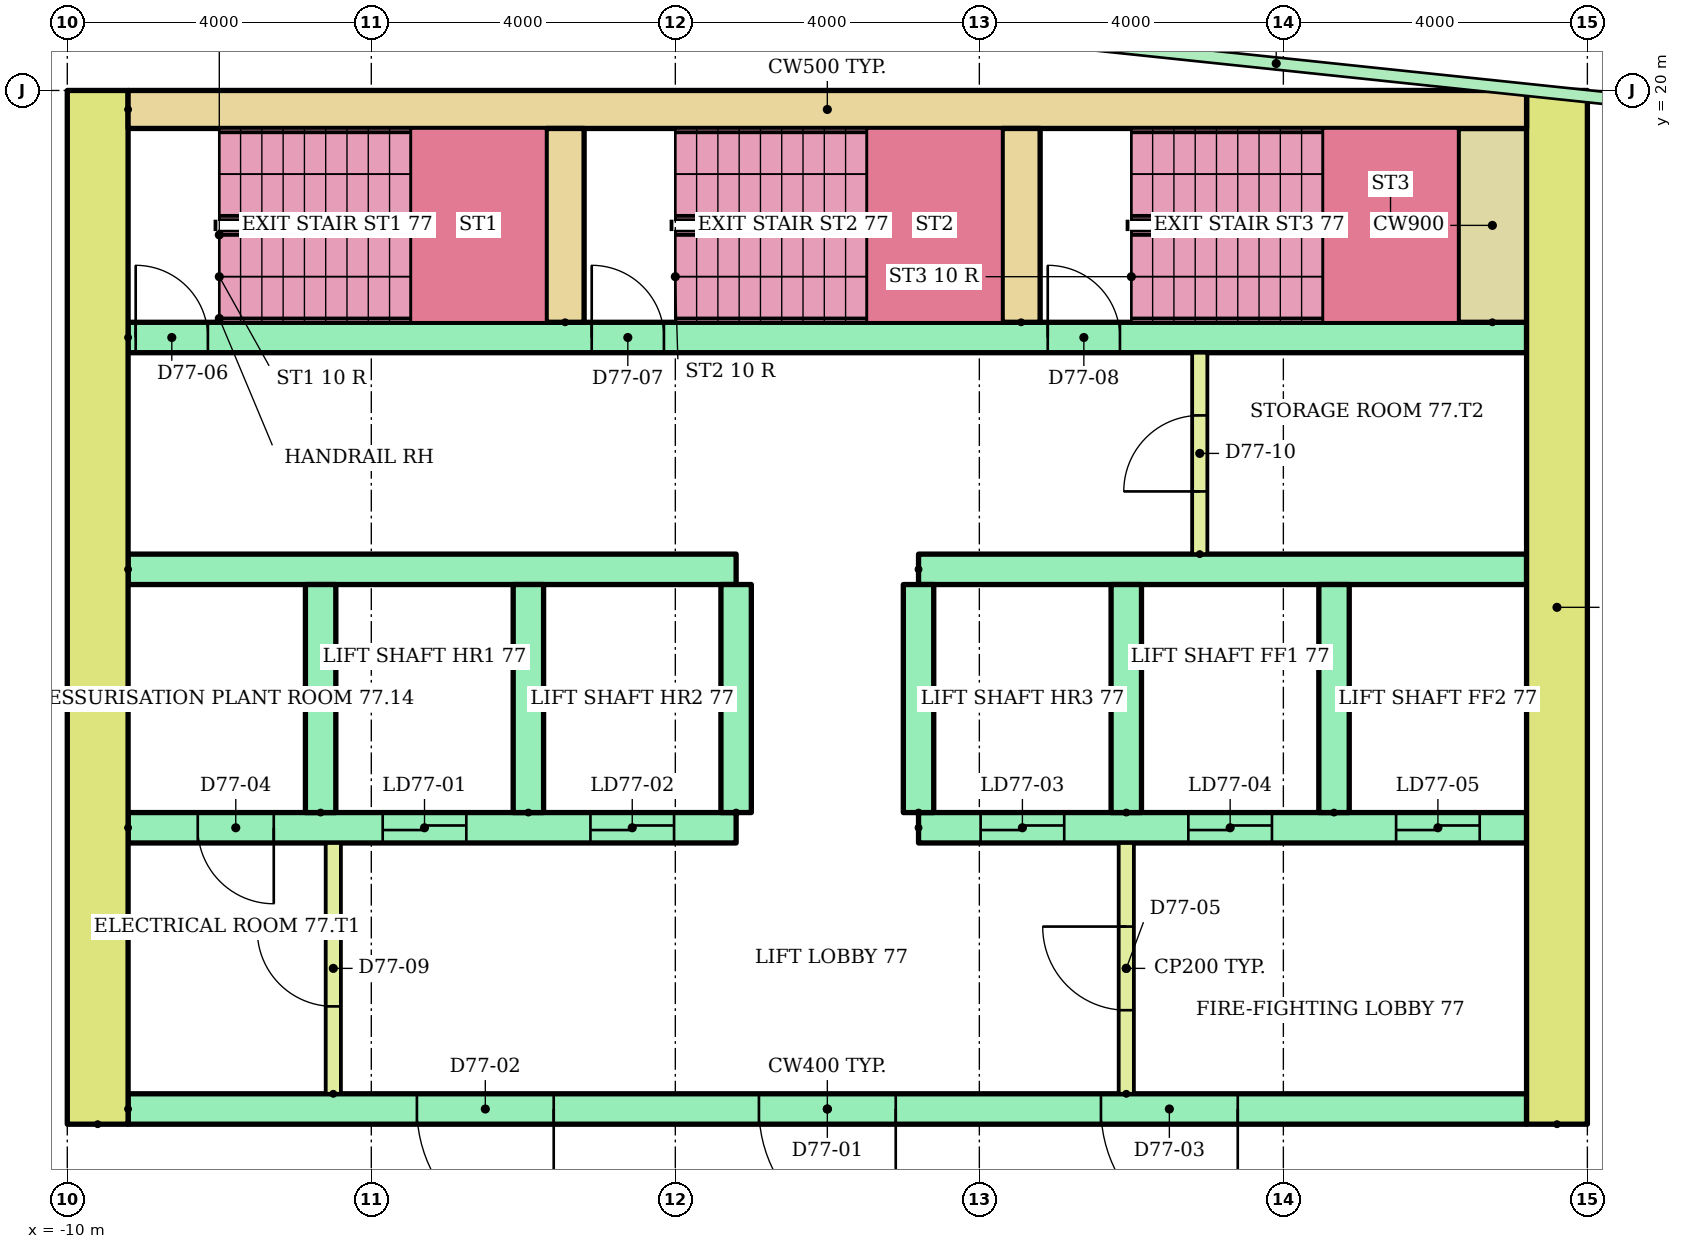
"""IFC4 building model, lengths in metres.
Left out: names, types, materials, properties, quantities, classifications, styles, units other than length and angle.
Written with IfcOpenShell. Run it as: python <this file> out.ifc"""

import sys

from ifc_helpers import new_model, si_unit, direction, frame, frame_2d, origin, place, context, subcontext, project, spatial, rectangle, extrude, element, fill, save


model = new_model("IFC4")
c1 = context("Model", 3, precision=1e-05, world=origin(), true_north=direction((0.0, 1.0)))
c2 = subcontext(c1, "Body", "Model", "MODEL_VIEW")
j1 = project(units=[si_unit("LENGTHUNIT", "METRE"), si_unit("PLANEANGLEUNIT", "RADIAN")], contexts=[c1])
p1 = place(None, origin())
s1 = spatial("IfcSite", under=j1, at=p1, CompositionType="ELEMENT")
p2 = place(p1, origin())
s2 = spatial("IfcBuilding", under=s1, at=p2, CompositionType="ELEMENT")
p3 = place(p2, frame((0.0, 0.0, 298.3)))
s3 = spatial("IfcBuildingStorey", under=s2, at=p3, CompositionType="ELEMENT", Elevation=298.3)
for number, where, z_axis, x_axis in (
    (1, (-9.6, 6.4, 0.0), (0.0, 0.0, 1.0), (0.0, 1.0, 0.0)),
    (2, (9.6, 6.4, 0.0), (0.0, 0.0, 1.0), (0.0, 1.0, 0.0)),
):
    element("IfcWall", number, at=place(p3, frame(where, z_axis=z_axis, x_axis=x_axis)), inside=s3, PredefinedType="SHEAR", context=c2, shape_type="SweptSolid", body=[
        extrude(rectangle(XDim=13.6, YDim=0.8, at=frame_2d((6.8, 0.0))), origin(), (0.0, 0.0, 1.0), 2.9),
    ])
p4 = place(p3, frame((-9.2, 19.75, 0.0)))
e3 = element("IfcWall", 3, at=p4, inside=s3, PredefinedType="SHEAR", context=c2, shape_type="SweptSolid", body=[
    extrude(rectangle(XDim=18.4, YDim=0.5, at=frame_2d((9.2, 0.0))), origin(), (0.0, 0.0, 1.0), 2.9),
])
p5 = place(p3, frame((-9.2, 6.6, 0.0)))
e4 = element("IfcWall", 4, at=p5, inside=s3, PredefinedType="SHEAR", context=c2, shape_type="SweptSolid", body=[
    extrude(rectangle(XDim=18.4, YDim=0.4, at=frame_2d((9.2, 0.0))), origin(), (0.0, 0.0, 1.0), 2.9),
])
p6 = place(p5, frame((8.3, 0.0, 0.0)))
e5 = element("IfcOpeningElement", 5, at=p6, cuts=e4, PredefinedType="OPENING", context=c2, shape_type="SweptSolid", body=[
    extrude(rectangle(XDim=1.8, YDim=2.1, at=frame_2d((0.9, 1.05))), frame((0.0, 0.21, 0.0), z_axis=(0.0, -1.0, 0.0), x_axis=(1.0, 0.0, 0.0)), (0.0, 0.0, 1.0), 0.42),
])
p7 = place(p5, frame((3.8, 0.0, 0.0)))
e6 = element("IfcOpeningElement", 6, at=p7, cuts=e4, PredefinedType="OPENING", context=c2, shape_type="SweptSolid", body=[
    extrude(rectangle(XDim=1.8, YDim=2.1, at=frame_2d((0.9, 1.05))), frame((0.0, 0.21, 0.0), z_axis=(0.0, -1.0, 0.0), x_axis=(1.0, 0.0, 0.0)), (0.0, 0.0, 1.0), 0.42),
])
p8 = place(p5, frame((12.8, 0.0, 0.0)))
e7 = element("IfcOpeningElement", 7, at=p8, cuts=e4, PredefinedType="OPENING", context=c2, shape_type="SweptSolid", body=[
    extrude(rectangle(XDim=1.8, YDim=2.1, at=frame_2d((0.9, 1.05))), frame((0.0, 0.21, 0.0), z_axis=(0.0, -1.0, 0.0), x_axis=(1.0, 0.0, 0.0)), (0.0, 0.0, 1.0), 0.42),
])
p9 = place(p3, frame((-9.2, 10.3, 0.0)))
e8 = element("IfcWall", 8, at=p9, inside=s3, PredefinedType="SHEAR", context=c2, shape_type="SweptSolid", body=[
    extrude(rectangle(XDim=8.0, YDim=0.4, at=frame_2d((4.0, 0.0))), origin(), (0.0, 0.0, 1.0), 2.9),
])
p10 = place(p9, frame((3.35, 0.0, 0.0)))
e9 = element("IfcOpeningElement", 9, at=p10, cuts=e8, PredefinedType="OPENING", context=c2, shape_type="SweptSolid", body=[
    extrude(rectangle(XDim=1.1, YDim=2.1, at=frame_2d((0.55, 1.05))), frame((0.0, 0.21, 0.0), z_axis=(0.0, -1.0, 0.0), x_axis=(1.0, 0.0, 0.0)), (0.0, 0.0, 1.0), 0.42),
])
p11 = place(p9, frame((6.083, 0.0, 0.0)))
e10 = element("IfcOpeningElement", 10, at=p11, cuts=e8, PredefinedType="OPENING", context=c2, shape_type="SweptSolid", body=[
    extrude(rectangle(XDim=1.1, YDim=2.1, at=frame_2d((0.55, 1.05))), frame((0.0, 0.21, 0.0), z_axis=(0.0, -1.0, 0.0), x_axis=(1.0, 0.0, 0.0)), (0.0, 0.0, 1.0), 0.42),
])
p12 = place(p9, frame((0.917, 0.0, 0.0)))
e11 = element("IfcOpeningElement", 11, at=p12, cuts=e8, PredefinedType="OPENING", context=c2, shape_type="SweptSolid", body=[
    extrude(rectangle(XDim=1.0, YDim=2.1, at=frame_2d((0.5, 1.05))), frame((0.0, 0.21, 0.0), z_axis=(0.0, -1.0, 0.0), x_axis=(1.0, 0.0, 0.0)), (0.0, 0.0, 1.0), 0.42),
])
p13 = place(p3, frame((-9.2, 13.7, 0.0)))
e12 = element("IfcWall", 12, at=p13, inside=s3, PredefinedType="SHEAR", context=c2, shape_type="SweptSolid", body=[
    extrude(rectangle(XDim=8.0, YDim=0.4, at=frame_2d((4.0, 0.0))), origin(), (0.0, 0.0, 1.0), 2.9),
])
p14 = place(p3, frame((1.2, 10.3, 0.0)))
e13 = element("IfcWall", 13, at=p14, inside=s3, PredefinedType="SHEAR", context=c2, shape_type="SweptSolid", body=[
    extrude(rectangle(XDim=8.0, YDim=0.4, at=frame_2d((4.0, 0.0))), origin(), (0.0, 0.0, 1.0), 2.9),
])
p15 = place(p14, frame((0.817, 0.0, 0.0)))
e14 = element("IfcOpeningElement", 14, at=p15, cuts=e13, PredefinedType="OPENING", context=c2, shape_type="SweptSolid", body=[
    extrude(rectangle(XDim=1.1, YDim=2.1, at=frame_2d((0.55, 1.05))), frame((0.0, 0.21, 0.0), z_axis=(0.0, -1.0, 0.0), x_axis=(1.0, 0.0, 0.0)), (0.0, 0.0, 1.0), 0.42),
])
p16 = place(p14, frame((3.55, 0.0, 0.0)))
e15 = element("IfcOpeningElement", 15, at=p16, cuts=e13, PredefinedType="OPENING", context=c2, shape_type="SweptSolid", body=[
    extrude(rectangle(XDim=1.1, YDim=2.1, at=frame_2d((0.55, 1.05))), frame((0.0, 0.21, 0.0), z_axis=(0.0, -1.0, 0.0), x_axis=(1.0, 0.0, 0.0)), (0.0, 0.0, 1.0), 0.42),
])
p17 = place(p14, frame((6.283, 0.0, 0.0)))
e16 = element("IfcOpeningElement", 16, at=p17, cuts=e13, PredefinedType="OPENING", context=c2, shape_type="SweptSolid", body=[
    extrude(rectangle(XDim=1.1, YDim=2.1, at=frame_2d((0.55, 1.05))), frame((0.0, 0.21, 0.0), z_axis=(0.0, -1.0, 0.0), x_axis=(1.0, 0.0, 0.0)), (0.0, 0.0, 1.0), 0.42),
])
p18 = place(p3, frame((1.2, 13.7, 0.0)))
e17 = element("IfcWall", 17, at=p18, inside=s3, PredefinedType="SHEAR", context=c2, shape_type="SweptSolid", body=[
    extrude(rectangle(XDim=8.0, YDim=0.4, at=frame_2d((4.0, 0.0))), origin(), (0.0, 0.0, 1.0), 2.9),
])
for number, where, z_axis, x_axis in (
    (18, (-6.667, 10.5, 0.0), (0.0, 0.0, 1.0), (0.0, 1.0, 0.0)),
    (19, (-3.933, 10.5, 0.0), (0.0, 0.0, 1.0), (0.0, 1.0, 0.0)),
    (20, (-1.2, 10.5, 0.0), (0.0, 0.0, 1.0), (0.0, 1.0, 0.0)),
    (21, (1.2, 10.5, 0.0), (0.0, 0.0, 1.0), (0.0, 1.0, 0.0)),
    (22, (3.933, 10.5, 0.0), (0.0, 0.0, 1.0), (0.0, 1.0, 0.0)),
    (23, (6.667, 10.5, 0.0), (0.0, 0.0, 1.0), (0.0, 1.0, 0.0)),
):
    element("IfcWall", number, at=place(p3, frame(where, z_axis=z_axis, x_axis=x_axis)), inside=s3, PredefinedType="SHEAR", context=c2, shape_type="SweptSolid", body=[
        extrude(rectangle(XDim=3.0, YDim=0.4, at=frame_2d((1.5, 0.0))), origin(), (0.0, 0.0, 1.0), 2.9),
    ])
p19 = place(p3, frame((3.933, 6.8, 0.0), z_axis=(0.0, 0.0, 1.0), x_axis=(0.0, 1.0, 0.0)))
e24 = element("IfcWall", 24, at=p19, inside=s3, PredefinedType="PARTITIONING", context=c2, shape_type="SweptSolid", body=[
    extrude(rectangle(XDim=3.3, YDim=0.2, at=frame_2d((1.65, 0.0))), origin(), (0.0, 0.0, 1.0), 2.9),
])
p20 = place(p19, frame((1.1, 0.0, 0.0)))
e25 = element("IfcOpeningElement", 25, at=p20, cuts=e24, PredefinedType="OPENING", context=c2, shape_type="SweptSolid", body=[
    extrude(rectangle(XDim=1.1, YDim=2.1, at=frame_2d((0.55, 1.05))), frame((0.0, 0.11, 0.0), z_axis=(0.0, -1.0, 0.0), x_axis=(1.0, 0.0, 0.0)), (0.0, 0.0, 1.0), 0.22),
])
p21 = place(p3, frame((-9.2, 16.75, 0.0)))
e26 = element("IfcWall", 26, at=p21, inside=s3, PredefinedType="SHEAR", context=c2, shape_type="SweptSolid", body=[
    extrude(rectangle(XDim=18.4, YDim=0.4, at=frame_2d((9.2, 0.0))), origin(), (0.0, 0.0, 1.0), 2.9),
])
p22 = place(p21, frame((0.1, 0.0, 0.0)))
e27 = element("IfcOpeningElement", 27, at=p22, cuts=e26, PredefinedType="OPENING", context=c2, shape_type="SweptSolid", body=[
    extrude(rectangle(XDim=0.95, YDim=2.1, at=frame_2d((0.475, 1.05))), frame((0.0, 0.21, 0.0), z_axis=(0.0, -1.0, 0.0), x_axis=(1.0, 0.0, 0.0)), (0.0, 0.0, 1.0), 0.42),
])
p23 = place(p21, frame((6.1, 0.0, 0.0)))
e28 = element("IfcOpeningElement", 28, at=p23, cuts=e26, PredefinedType="OPENING", context=c2, shape_type="SweptSolid", body=[
    extrude(rectangle(XDim=0.95, YDim=2.1, at=frame_2d((0.475, 1.05))), frame((0.0, 0.21, 0.0), z_axis=(0.0, -1.0, 0.0), x_axis=(1.0, 0.0, 0.0)), (0.0, 0.0, 1.0), 0.42),
])
p24 = place(p21, frame((12.1, 0.0, 0.0)))
e29 = element("IfcOpeningElement", 29, at=p24, cuts=e26, PredefinedType="OPENING", context=c2, shape_type="SweptSolid", body=[
    extrude(rectangle(XDim=0.95, YDim=2.1, at=frame_2d((0.475, 1.05))), frame((0.0, 0.21, 0.0), z_axis=(0.0, -1.0, 0.0), x_axis=(1.0, 0.0, 0.0)), (0.0, 0.0, 1.0), 0.42),
])
for number, where, z_axis, x_axis in (
    (30, (-3.45, 16.95, 0.0), (0.0, 0.0, 1.0), (0.0, 1.0, 0.0)),
    (31, (2.55, 16.95, 0.0), (0.0, 0.0, 1.0), (0.0, 1.0, 0.0)),
):
    element("IfcWall", number, at=place(p3, frame(where, z_axis=z_axis, x_axis=x_axis)), inside=s3, PredefinedType="SHEAR", context=c2, shape_type="SweptSolid", body=[
        extrude(rectangle(XDim=2.55, YDim=0.5, at=frame_2d((1.275, 0.0))), origin(), (0.0, 0.0, 1.0), 2.9),
    ])
p25 = place(p3, frame((8.75, 16.95, 0.0), z_axis=(0.0, 0.0, 1.0), x_axis=(0.0, 1.0, 0.0)))
e32 = element("IfcWall", 32, at=p25, inside=s3, PredefinedType="SHEAR", context=c2, shape_type="SweptSolid", body=[
    extrude(rectangle(XDim=2.55, YDim=0.9, at=frame_2d((1.275, 0.0))), origin(), (0.0, 0.0, 1.0), 2.9),
])
p26 = place(p3, frame((-6.5, 6.8, 0.0), z_axis=(0.0, 0.0, 1.0), x_axis=(0.0, 1.0, 0.0)))
e33 = element("IfcWall", 33, at=p26, inside=s3, PredefinedType="PARTITIONING", context=c2, shape_type="SweptSolid", body=[
    extrude(rectangle(XDim=3.3, YDim=0.2, at=frame_2d((1.65, 0.0))), origin(), (0.0, 0.0, 1.0), 2.9),
])
p27 = place(p26, frame((1.15, 0.0, 0.0)))
e34 = element("IfcOpeningElement", 34, at=p27, cuts=e33, PredefinedType="OPENING", context=c2, shape_type="SweptSolid", body=[
    extrude(rectangle(XDim=1.0, YDim=2.1, at=frame_2d((0.5, 1.05))), frame((0.0, 0.11, 0.0), z_axis=(0.0, -1.0, 0.0), x_axis=(1.0, 0.0, 0.0)), (0.0, 0.0, 1.0), 0.22),
])
p28 = place(p3, frame((4.9, 13.9, 0.0), z_axis=(0.0, 0.0, 1.0), x_axis=(0.0, 1.0, 0.0)))
e35 = element("IfcWall", 35, at=p28, inside=s3, PredefinedType="PARTITIONING", context=c2, shape_type="SweptSolid", body=[
    extrude(rectangle(XDim=2.65, YDim=0.2, at=frame_2d((1.325, 0.0))), origin(), (0.0, 0.0, 1.0), 2.9),
])
p29 = place(p28, frame((0.825, 0.0, 0.0)))
e36 = element("IfcOpeningElement", 36, at=p29, cuts=e35, PredefinedType="OPENING", context=c2, shape_type="SweptSolid", body=[
    extrude(rectangle(XDim=1.0, YDim=2.1, at=frame_2d((0.5, 1.05))), frame((0.0, 0.11, 0.0), z_axis=(0.0, -1.0, 0.0), x_axis=(1.0, 0.0, 0.0)), (0.0, 0.0, 1.0), 0.22),
])
p30 = place(p6, frame((1.8, 0.0, 0.0), z_axis=(0.0, 0.0, 1.0), x_axis=(-1.0, 0.0, 0.0)))
e37 = element("IfcDoor", 37, at=p30, inside=s3, OperationType="DOUBLE_DOOR_SINGLE_SWING", PredefinedType="DOOR", context=c2, shape_type="SweptSolid", body=[
    extrude(rectangle(XDim=1.8, YDim=2.1, at=frame_2d((0.9, 1.05))), frame((0.0, 0.025, 0.0), z_axis=(0.0, -1.0, 0.0), x_axis=(1.0, 0.0, 0.0)), (0.0, 0.0, 1.0), 0.05),
])
fill(e5, e37)
p31 = place(p7, frame((1.8, 0.0, 0.0), z_axis=(0.0, 0.0, 1.0), x_axis=(-1.0, 0.0, 0.0)))
e38 = element("IfcDoor", 38, at=p31, inside=s3, OperationType="DOUBLE_DOOR_SINGLE_SWING", PredefinedType="DOOR", context=c2, shape_type="SweptSolid", body=[
    extrude(rectangle(XDim=1.8, YDim=2.1, at=frame_2d((0.9, 1.05))), frame((0.0, 0.025, 0.0), z_axis=(0.0, -1.0, 0.0), x_axis=(1.0, 0.0, 0.0)), (0.0, 0.0, 1.0), 0.05),
])
fill(e6, e38)
p32 = place(p8, frame((1.8, 0.0, 0.0), z_axis=(0.0, 0.0, 1.0), x_axis=(-1.0, 0.0, 0.0)))
e39 = element("IfcDoor", 39, at=p32, inside=s3, OperationType="DOUBLE_DOOR_SINGLE_SWING", PredefinedType="DOOR", context=c2, shape_type="SweptSolid", body=[
    extrude(rectangle(XDim=1.8, YDim=2.1, at=frame_2d((0.9, 1.05))), frame((0.0, 0.025, 0.0), z_axis=(0.0, -1.0, 0.0), x_axis=(1.0, 0.0, 0.0)), (0.0, 0.0, 1.0), 0.05),
])
fill(e7, e39)
p33 = place(p10, origin())
e40 = element("IfcDoor", 40, at=p33, inside=s3, OperationType="SLIDING_TO_LEFT", PredefinedType="DOOR", context=c2, shape_type="SweptSolid", body=[
    extrude(rectangle(XDim=1.1, YDim=2.1, at=frame_2d((0.55, 1.05))), frame((0.0, 0.025, 0.0), z_axis=(0.0, -1.0, 0.0), x_axis=(1.0, 0.0, 0.0)), (0.0, 0.0, 1.0), 0.05),
])
fill(e9, e40)
p34 = place(p11, origin())
e41 = element("IfcDoor", 41, at=p34, inside=s3, OperationType="SLIDING_TO_LEFT", PredefinedType="DOOR", context=c2, shape_type="SweptSolid", body=[
    extrude(rectangle(XDim=1.1, YDim=2.1, at=frame_2d((0.55, 1.05))), frame((0.0, 0.025, 0.0), z_axis=(0.0, -1.0, 0.0), x_axis=(1.0, 0.0, 0.0)), (0.0, 0.0, 1.0), 0.05),
])
fill(e10, e41)
p35 = place(p15, origin())
e42 = element("IfcDoor", 42, at=p35, inside=s3, OperationType="SLIDING_TO_LEFT", PredefinedType="DOOR", context=c2, shape_type="SweptSolid", body=[
    extrude(rectangle(XDim=1.1, YDim=2.1, at=frame_2d((0.55, 1.05))), frame((0.0, 0.025, 0.0), z_axis=(0.0, -1.0, 0.0), x_axis=(1.0, 0.0, 0.0)), (0.0, 0.0, 1.0), 0.05),
])
fill(e14, e42)
p36 = place(p16, origin())
e43 = element("IfcDoor", 43, at=p36, inside=s3, OperationType="SLIDING_TO_LEFT", PredefinedType="DOOR", context=c2, shape_type="SweptSolid", body=[
    extrude(rectangle(XDim=1.1, YDim=2.1, at=frame_2d((0.55, 1.05))), frame((0.0, 0.025, 0.0), z_axis=(0.0, -1.0, 0.0), x_axis=(1.0, 0.0, 0.0)), (0.0, 0.0, 1.0), 0.05),
])
fill(e15, e43)
p37 = place(p17, origin())
e44 = element("IfcDoor", 44, at=p37, inside=s3, OperationType="SLIDING_TO_LEFT", PredefinedType="DOOR", context=c2, shape_type="SweptSolid", body=[
    extrude(rectangle(XDim=1.1, YDim=2.1, at=frame_2d((0.55, 1.05))), frame((0.0, 0.025, 0.0), z_axis=(0.0, -1.0, 0.0), x_axis=(1.0, 0.0, 0.0)), (0.0, 0.0, 1.0), 0.05),
])
fill(e16, e44)
p38 = place(p12, frame((1.0, 0.0, 0.0), z_axis=(0.0, 0.0, 1.0), x_axis=(-1.0, 0.0, 0.0)))
e45 = element("IfcDoor", 45, at=p38, inside=s3, OperationType="SINGLE_SWING_RIGHT", PredefinedType="DOOR", context=c2, shape_type="SweptSolid", body=[
    extrude(rectangle(XDim=1.0, YDim=2.1, at=frame_2d((0.5, 1.05))), frame((0.0, 0.025, 0.0), z_axis=(0.0, -1.0, 0.0), x_axis=(1.0, 0.0, 0.0)), (0.0, 0.0, 1.0), 0.05),
])
fill(e11, e45)
p39 = place(p20, origin())
e46 = element("IfcDoor", 46, at=p39, inside=s3, OperationType="SINGLE_SWING_RIGHT", PredefinedType="DOOR", context=c2, shape_type="SweptSolid", body=[
    extrude(rectangle(XDim=1.1, YDim=2.1, at=frame_2d((0.55, 1.05))), frame((0.0, 0.025, 0.0), z_axis=(0.0, -1.0, 0.0), x_axis=(1.0, 0.0, 0.0)), (0.0, 0.0, 1.0), 0.05),
])
fill(e25, e46)
p40 = place(p22, origin())
e47 = element("IfcDoor", 47, at=p40, inside=s3, OperationType="SINGLE_SWING_LEFT", PredefinedType="DOOR", context=c2, shape_type="SweptSolid", body=[
    extrude(rectangle(XDim=0.95, YDim=2.1, at=frame_2d((0.475, 1.05))), frame((0.0, 0.025, 0.0), z_axis=(0.0, -1.0, 0.0), x_axis=(1.0, 0.0, 0.0)), (0.0, 0.0, 1.0), 0.05),
])
fill(e27, e47)
p41 = place(p23, origin())
e48 = element("IfcDoor", 48, at=p41, inside=s3, OperationType="SINGLE_SWING_LEFT", PredefinedType="DOOR", context=c2, shape_type="SweptSolid", body=[
    extrude(rectangle(XDim=0.95, YDim=2.1, at=frame_2d((0.475, 1.05))), frame((0.0, 0.025, 0.0), z_axis=(0.0, -1.0, 0.0), x_axis=(1.0, 0.0, 0.0)), (0.0, 0.0, 1.0), 0.05),
])
fill(e28, e48)
p42 = place(p24, origin())
e49 = element("IfcDoor", 49, at=p42, inside=s3, OperationType="SINGLE_SWING_LEFT", PredefinedType="DOOR", context=c2, shape_type="SweptSolid", body=[
    extrude(rectangle(XDim=0.95, YDim=2.1, at=frame_2d((0.475, 1.05))), frame((0.0, 0.025, 0.0), z_axis=(0.0, -1.0, 0.0), x_axis=(1.0, 0.0, 0.0)), (0.0, 0.0, 1.0), 0.05),
])
fill(e29, e49)
p43 = place(p27, origin())
e50 = element("IfcDoor", 50, at=p43, inside=s3, OperationType="SINGLE_SWING_RIGHT", PredefinedType="DOOR", context=c2, shape_type="SweptSolid", body=[
    extrude(rectangle(XDim=1.0, YDim=2.1, at=frame_2d((0.5, 1.05))), frame((0.0, 0.025, 0.0), z_axis=(0.0, -1.0, 0.0), x_axis=(1.0, 0.0, 0.0)), (0.0, 0.0, 1.0), 0.05),
])
fill(e34, e50)
p44 = place(p29, origin())
e51 = element("IfcDoor", 51, at=p44, inside=s3, OperationType="SINGLE_SWING_LEFT", PredefinedType="DOOR", context=c2, shape_type="SweptSolid", body=[
    extrude(rectangle(XDim=1.0, YDim=2.1, at=frame_2d((0.5, 1.05))), frame((0.0, 0.025, 0.0), z_axis=(0.0, -1.0, 0.0), x_axis=(1.0, 0.0, 0.0)), (0.0, 0.0, 1.0), 0.05),
])
fill(e36, e51)
save(model, sys.argv[1])
